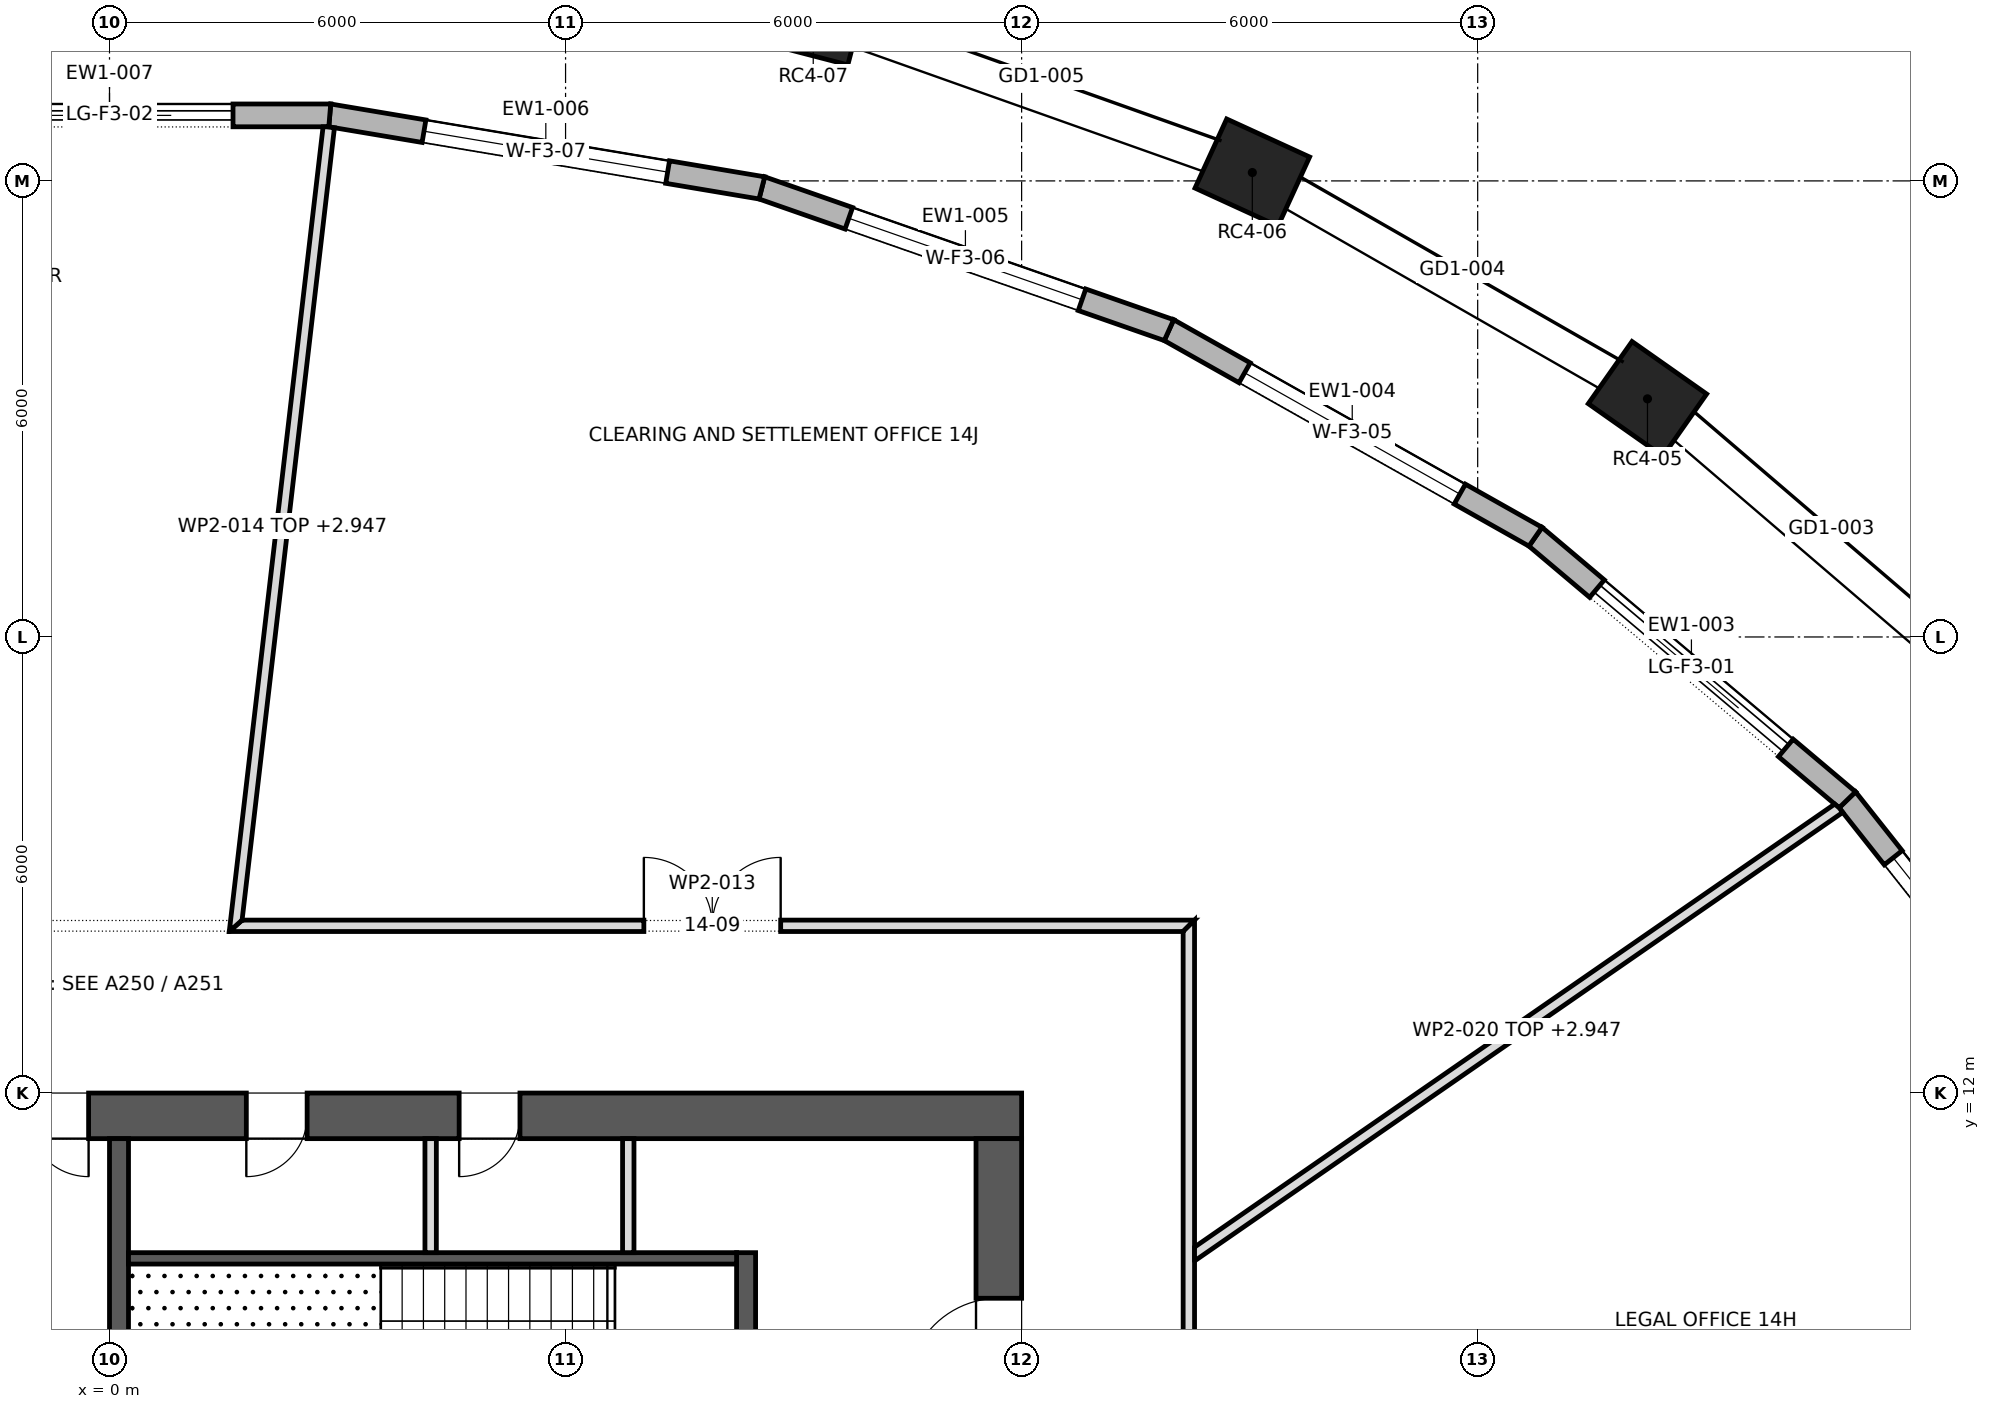
"""IFC4 building model, lengths in metres.
Left out: names, types, materials, properties, quantities, classifications, styles, units other than length and angle.
Written with IfcOpenShell. Run it as: python <this file> out.ifc"""

import sys

from ifc_helpers import new_model, si_unit, direction, frame, frame_2d, origin, origin_2d, place, context, subcontext, project, spatial, polyline, rectangle, outline, extrude, element, fill, save


model = new_model("IFC4")
c1 = context("Model", 3, precision=1e-05, world=origin(), true_north=direction((0.0, 1.0)))
c2 = subcontext(c1, "Body", "Model", "MODEL_VIEW")
j1 = project(units=[si_unit("LENGTHUNIT", "METRE"), si_unit("PLANEANGLEUNIT", "RADIAN")], contexts=[c1])
p1 = place(None, origin())
s1 = spatial("IfcSite", under=j1, at=p1, CompositionType="ELEMENT")
p2 = place(p1, origin())
s2 = spatial("IfcBuilding", under=s1, at=p2, CompositionType="ELEMENT")
p3 = place(p2, frame((0.0, 0.0, 210.9)))
s3 = spatial("IfcBuildingStorey", under=s2, at=p3, CompositionType="ELEMENT", Elevation=210.9)
for number, where, z_axis, x_axis in (
    (1, (20.234, 21.133, 0.0), (0.0, 0.0, 1.0), (-0.818, 0.575, 0.0)),
    (2, (15.035, 24.11, 0.0), (0.0, 0.0, 1.0), (-0.909, 0.417, 0.0)),
    (3, (9.259, 26.161, 0.0), (0.0, 0.0, 1.0), (-0.968, 0.252, 0.0)),
):
    element("IfcColumn", number, at=place(p3, frame(where, z_axis=z_axis, x_axis=x_axis)), inside=s3, PredefinedType="COLUMN", context=c2, shape_type="SweptSolid", body=[
        extrude(rectangle(XDim=1.2, YDim=1.0, at=origin_2d()), origin(), (0.0, 0.0, 1.0), 4.0),
    ])
p4 = place(p3, frame((-12.0, 11.7, 0.0), z_axis=(0.0, 0.0, 1.0), x_axis=(1.0, 0.0, 0.0)))
e4 = element("IfcWall", 4, at=p4, inside=s3, PredefinedType="SHEAR", context=c2, shape_type="SweptSolid", body=[
    extrude(rectangle(XDim=24.0, YDim=0.6, at=frame_2d((12.0, 0.0))), origin(), (0.0, 0.0, 1.0), 4.0),
])
p5 = place(p4, frame((9.225, 0.0, 0.0)))
e5 = element("IfcOpeningElement", 5, at=p5, cuts=e4, PredefinedType="OPENING", context=c2, shape_type="SweptSolid", body=[
    extrude(rectangle(XDim=0.9, YDim=2.1, at=frame_2d((0.45, 1.05))), frame((0.0, 0.312, 0.0), z_axis=(0.0, -1.0, 0.0), x_axis=(1.0, 0.0, 0.0)), (0.0, 0.0, 1.0), 0.624),
])
p6 = place(p4, frame((10.925, 0.0, 0.0)))
e6 = element("IfcOpeningElement", 6, at=p6, cuts=e4, PredefinedType="OPENING", context=c2, shape_type="SweptSolid", body=[
    extrude(rectangle(XDim=0.8, YDim=2.1, at=frame_2d((0.4, 1.05))), frame((0.0, 0.312, 0.0), z_axis=(0.0, -1.0, 0.0), x_axis=(1.0, 0.0, 0.0)), (0.0, 0.0, 1.0), 0.624),
])
p7 = place(p4, frame((4.2, 0.0, 0.0)))
e7 = element("IfcOpeningElement", 7, at=p7, cuts=e4, PredefinedType="OPENING", context=c2, shape_type="SweptSolid", body=[
    extrude(rectangle(XDim=0.8, YDim=2.1, at=frame_2d((0.4, 1.05))), frame((0.0, 0.312, 0.0), z_axis=(0.0, -1.0, 0.0), x_axis=(1.0, 0.0, 0.0)), (0.0, 0.0, 1.0), 0.624),
])
p8 = place(p4, frame((13.8, 0.0, 0.0)))
e8 = element("IfcOpeningElement", 8, at=p8, cuts=e4, PredefinedType="OPENING", context=c2, shape_type="SweptSolid", body=[
    extrude(rectangle(XDim=0.8, YDim=2.1, at=frame_2d((0.4, 1.05))), frame((0.0, 0.312, 0.0), z_axis=(0.0, -1.0, 0.0), x_axis=(1.0, 0.0, 0.0)), (0.0, 0.0, 1.0), 0.624),
])
p9 = place(p4, frame((16.6, 0.0, 0.0)))
e9 = element("IfcOpeningElement", 9, at=p9, cuts=e4, PredefinedType="OPENING", context=c2, shape_type="SweptSolid", body=[
    extrude(rectangle(XDim=0.8, YDim=2.1, at=frame_2d((0.4, 1.05))), frame((0.0, 0.312, 0.0), z_axis=(0.0, -1.0, 0.0), x_axis=(1.0, 0.0, 0.0)), (0.0, 0.0, 1.0), 0.624),
])
p10 = place(p3, frame((11.7, -11.4, 0.0), z_axis=(0.0, 0.0, 1.0), x_axis=(0.0, 1.0, 0.0)))
e10 = element("IfcWall", 10, at=p10, inside=s3, PredefinedType="SHEAR", context=c2, shape_type="SweptSolid", body=[
    extrude(rectangle(XDim=22.8, YDim=0.6, at=frame_2d((11.4, 0.0))), origin(), (0.0, 0.0, 1.0), 4.0),
])
p11 = place(p10, frame((10.2, 0.0, 0.0)))
e11 = element("IfcOpeningElement", 11, at=p11, cuts=e10, PredefinedType="OPENING", context=c2, shape_type="SweptSolid", body=[
    extrude(rectangle(XDim=2.4, YDim=2.1, at=frame_2d((1.2, 1.05))), frame((0.0, 0.312, 0.0), z_axis=(0.0, -1.0, 0.0), x_axis=(1.0, 0.0, 0.0)), (0.0, 0.0, 1.0), 0.624),
])
p12 = place(p10, frame((19.5, 0.0, 0.0)))
e12 = element("IfcOpeningElement", 12, at=p12, cuts=e10, PredefinedType="OPENING", context=c2, shape_type="SweptSolid", body=[
    extrude(rectangle(XDim=1.2, YDim=2.1, at=frame_2d((0.6, 1.05))), frame((0.0, 0.312, 0.0), z_axis=(0.0, -1.0, 0.0), x_axis=(1.0, 0.0, 0.0)), (0.0, 0.0, 1.0), 0.624),
])
p13 = place(p10, frame((2.1, 0.0, 0.0)))
e13 = element("IfcOpeningElement", 13, at=p13, cuts=e10, PredefinedType="OPENING", context=c2, shape_type="SweptSolid", body=[
    extrude(rectangle(XDim=1.2, YDim=2.1, at=frame_2d((0.6, 1.05))), frame((0.0, 0.312, 0.0), z_axis=(0.0, -1.0, 0.0), x_axis=(1.0, 0.0, 0.0)), (0.0, 0.0, 1.0), 0.624),
])
p14 = place(p3, frame((26.088, 11.786, 0.0), z_axis=(0.0, 0.0, 1.0), x_axis=(-0.620870264345, 0.783913333763, 0.0)))
e14 = element("IfcWall", 14, at=p14, inside=s3, PredefinedType="STANDARD", context=c2, shape_type="SweptSolid", body=[
    extrude(outline(polyline([(-0.016, -0.15), (5.21, -0.15), (5.179, 0.15), (0.016, 0.15), (-0.016, -0.15)])), origin(), (0.0, 0.0, 1.0), 3.7),
])
p15 = place(p14, frame((0.972, 0.0, 0.6)))
e15 = element("IfcOpeningElement", 15, at=p15, cuts=e14, PredefinedType="OPENING", context=c2, shape_type="SweptSolid", body=[
    extrude(rectangle(XDim=3.25, YDim=2.65, at=frame_2d((1.625, 1.325))), frame((0.0, 0.162, 0.0), z_axis=(0.0, -1.0, 0.0), x_axis=(1.0, 0.0, 0.0)), (0.0, 0.0, 1.0), 0.324),
])
p16 = place(p3, frame((22.863, 15.858, 0.0), z_axis=(0.0, 0.0, 1.0), x_axis=(-0.764386053229, 0.6447588399, 0.0)))
e16 = element("IfcWall", 16, at=p16, inside=s3, PredefinedType="STANDARD", context=c2, shape_type="SweptSolid", body=[
    extrude(outline(polyline([(-0.015, -0.15), (5.382, -0.15), (5.353, 0.15), (0.015, 0.15), (-0.015, -0.15)])), origin(), (0.0, 0.0, 1.0), 3.7),
])
p17 = place(p16, frame((1.059, 0.0, 0.0)))
e17 = element("IfcOpeningElement", 17, at=p17, cuts=e16, PredefinedType="OPENING", context=c2, shape_type="SweptSolid", body=[
    extrude(rectangle(XDim=3.25, YDim=3.25, at=frame_2d((1.625, 1.625))), frame((0.0, 0.162, 0.0), z_axis=(0.0, -1.0, 0.0), x_axis=(1.0, 0.0, 0.0)), (0.0, 0.0, 1.0), 0.324),
])
p18 = place(p3, frame((18.76, 19.319, 0.0), z_axis=(0.0, 0.0, 1.0), x_axis=(-0.871140546168, 0.491033755278, 0.0)))
e18 = element("IfcWall", 18, at=p18, inside=s3, PredefinedType="STANDARD", context=c2, shape_type="SweptSolid", body=[
    extrude(outline(polyline([(-0.014, -0.15), (5.549, -0.15), (5.522, 0.15), (0.014, 0.15), (-0.014, -0.15)])), origin(), (0.0, 0.0, 1.0), 3.7),
])
p19 = place(p18, frame((1.143, 0.0, 0.6)))
e19 = element("IfcOpeningElement", 19, at=p19, cuts=e18, PredefinedType="OPENING", context=c2, shape_type="SweptSolid", body=[
    extrude(rectangle(XDim=3.25, YDim=2.65, at=frame_2d((1.625, 1.325))), frame((0.0, 0.162, 0.0), z_axis=(0.0, -1.0, 0.0), x_axis=(1.0, 0.0, 0.0)), (0.0, 0.0, 1.0), 0.324),
])
p20 = place(p3, frame((13.938, 22.037, 0.0), z_axis=(0.0, 0.0, 1.0), x_axis=(-0.944023272224, 0.329878858824, 0.0)))
e20 = element("IfcWall", 20, at=p20, inside=s3, PredefinedType="STANDARD", context=c2, shape_type="SweptSolid", body=[
    extrude(outline(polyline([(-0.013, -0.15), (5.686, -0.15), (5.661, 0.15), (0.013, 0.15), (-0.013, -0.15)])), origin(), (0.0, 0.0, 1.0), 3.7),
])
p21 = place(p20, frame((1.212, 0.0, 0.6)))
e21 = element("IfcOpeningElement", 21, at=p21, cuts=e20, PredefinedType="OPENING", context=c2, shape_type="SweptSolid", body=[
    extrude(rectangle(XDim=3.25, YDim=2.65, at=frame_2d((1.625, 1.325))), frame((0.0, 0.162, 0.0), z_axis=(0.0, -1.0, 0.0), x_axis=(1.0, 0.0, 0.0)), (0.0, 0.0, 1.0), 0.324),
])
p22 = place(p3, frame((8.583, 23.908, 0.0), z_axis=(0.0, 0.0, 1.0), x_axis=(-0.98622052717, 0.165436005116, 0.0)))
e22 = element("IfcWall", 22, at=p22, inside=s3, PredefinedType="STANDARD", context=c2, shape_type="SweptSolid", body=[
    extrude(outline(polyline([(-0.013, -0.15), (5.777, -0.15), (5.752, 0.15), (0.013, 0.15), (-0.013, -0.15)])), origin(), (0.0, 0.0, 1.0), 3.7),
])
p23 = place(p22, frame((1.257, 0.0, 0.6)))
e23 = element("IfcOpeningElement", 23, at=p23, cuts=e22, PredefinedType="OPENING", context=c2, shape_type="SweptSolid", body=[
    extrude(rectangle(XDim=3.25, YDim=2.65, at=frame_2d((1.625, 1.325))), frame((0.0, 0.162, 0.0), z_axis=(0.0, -1.0, 0.0), x_axis=(1.0, 0.0, 0.0)), (0.0, 0.0, 1.0), 0.324),
])
p24 = place(p3, frame((2.898, 24.862, 0.0), z_axis=(0.0, 0.0, 1.0), x_axis=(-1.0, 0.0, 0.0)))
e24 = element("IfcWall", 24, at=p24, inside=s3, PredefinedType="STANDARD", context=c2, shape_type="SweptSolid", body=[
    extrude(outline(polyline([(-0.012, -0.15), (5.808, -0.15), (5.783, 0.15), (0.012, 0.15), (-0.012, -0.15)])), origin(), (0.0, 0.0, 1.0), 3.7),
])
p25 = place(p24, frame((1.273, 0.0, 0.0)))
e25 = element("IfcOpeningElement", 25, at=p25, cuts=e24, PredefinedType="OPENING", context=c2, shape_type="SweptSolid", body=[
    extrude(rectangle(XDim=3.25, YDim=3.25, at=frame_2d((1.625, 1.625))), frame((0.0, 0.162, 0.0), z_axis=(0.0, -1.0, 0.0), x_axis=(1.0, 0.0, 0.0)), (0.0, 0.0, 1.0), 0.324),
])
p26 = place(p3, frame((0.125, 6.5, 0.0), z_axis=(0.0, 0.0, 1.0), x_axis=(0.0, 1.0, 0.0)))
e26 = element("IfcWall", 26, at=p26, inside=s3, PredefinedType="SHEAR", context=c2, shape_type="SweptSolid", body=[
    extrude(rectangle(XDim=4.9, YDim=0.25, at=frame_2d((2.45, 0.0))), origin(), (0.0, 0.0, 1.0), 3.7),
])
p27 = place(p3, frame((8.375, 6.5, 0.0), z_axis=(0.0, 0.0, 1.0), x_axis=(0.0, 1.0, 0.0)))
e27 = element("IfcWall", 27, at=p27, inside=s3, PredefinedType="SHEAR", context=c2, shape_type="SweptSolid", body=[
    extrude(rectangle(XDim=3.4, YDim=0.25, at=frame_2d((1.7, 0.0))), origin(), (0.0, 0.0, 1.0), 3.7),
])
p28 = place(p27, frame((1.025, 0.0, 0.0)))
e28 = element("IfcOpeningElement", 28, at=p28, cuts=e27, PredefinedType="OPENING", context=c2, shape_type="SweptSolid", body=[
    extrude(rectangle(XDim=1.2, YDim=2.1, at=frame_2d((0.6, 1.05))), frame((0.0, 0.137, 0.0), z_axis=(0.0, -1.0, 0.0), x_axis=(1.0, 0.0, 0.0)), (0.0, 0.0, 1.0), 0.274),
])
p29 = place(p3, frame((0.25, 9.825, 0.0), z_axis=(0.0, 0.0, 1.0), x_axis=(1.0, 0.0, 0.0)))
e29 = element("IfcWall", 29, at=p29, inside=s3, PredefinedType="SHEAR", context=c2, shape_type="SweptSolid", body=[
    extrude(rectangle(XDim=8.0, YDim=0.15, at=frame_2d((4.0, 0.0))), origin(), (0.0, 0.0, 1.0), 3.7),
])
for number, where, z_axis, x_axis in (
    (30, (4.225, 9.9, 0.0), (0.0, 0.0, 1.0), (0.0, 1.0, 0.0)),
    (31, (6.825, 9.9, 0.0), (0.0, 0.0, 1.0), (0.0, 1.0, 0.0)),
):
    element("IfcWall", number, at=place(p3, frame(where, z_axis=z_axis, x_axis=x_axis)), inside=s3, PredefinedType="PARTITIONING", context=c2, shape_type="SweptSolid", body=[
        extrude(rectangle(XDim=1.5, YDim=0.15, at=frame_2d((0.75, 0.0))), origin(), (0.0, 0.0, 1.0), 3.7),
    ])
p30 = place(p3, frame((1.576, 14.2, 0.0), z_axis=(0.0, 0.0, 1.0), x_axis=(1.0, 0.0, 0.0)))
e32 = element("IfcWall", 32, at=p30, inside=s3, PredefinedType="PARTITIONING", context=c2, shape_type="SweptSolid", body=[
    extrude(outline(polyline([(0.0, -0.075), (1.793, -0.075), (3.585, -0.075), (5.378, -0.075), (7.171, -0.075), (8.964, -0.075), (10.757, -0.075), (12.549, -0.075), (12.699, 0.075), (10.909, 0.075), (9.119, 0.075), (7.329, 0.075), (5.539, 0.075), (3.749, 0.075), (1.958, 0.075), (0.168, 0.075), (0.0, -0.075)])), origin(), (0.0, 0.0, 1.0), 3.7),
])
p31 = place(p30, frame((5.454, 0.0, 0.0)))
e33 = element("IfcOpeningElement", 33, at=p31, cuts=e32, PredefinedType="OPENING", context=c2, shape_type="SweptSolid", body=[
    extrude(rectangle(XDim=1.8, YDim=2.1, at=frame_2d((0.9, 1.05))), frame((0.0, 0.087, 0.0), z_axis=(0.0, -1.0, 0.0), x_axis=(1.0, 0.0, 0.0)), (0.0, 0.0, 1.0), 0.174),
])
p32 = place(p3, frame((2.885, 24.708, 0.0), z_axis=(0.0, 0.0, 1.0), x_axis=(-0.115779808049, -0.99327490457, 0.0)))
e34 = element("IfcWall", 34, at=p32, inside=s3, PredefinedType="PARTITIONING", context=c2, shape_type="SweptSolid", body=[
    extrude(outline(polyline([(0.005, -0.075), (1.781, -0.075), (3.558, -0.075), (5.334, -0.075), (7.111, -0.075), (8.887, -0.075), (10.663, -0.075), (10.579, 0.0), (10.495, 0.075), (8.746, 0.075), (6.997, 0.075), (5.248, 0.075), (3.498, 0.075), (1.749, 0.075), (0.0, 0.075), (0.0, -0.034), (0.005, -0.075)])), origin(), (0.0, 0.0, 1.0), 2.947),
])
p33 = place(p3, frame((14.2, 1.098, 0.0), z_axis=(0.0, 0.0, 1.0), x_axis=(0.0, 1.0, 0.0)))
e35 = element("IfcWall", 35, at=p33, inside=s3, PredefinedType="PARTITIONING", context=c2, shape_type="SweptSolid", body=[
    extrude(outline(polyline([(0.163, -0.075), (2.022, -0.075), (3.881, -0.075), (5.74, -0.075), (7.599, -0.075), (9.458, -0.075), (11.317, -0.075), (13.177, -0.075), (13.027, 0.075), (11.166, 0.075), (9.305, 0.075), (7.444, 0.075), (5.583, 0.075), (3.722, 0.075), (1.861, 0.075), (0.0, 0.075), (0.163, -0.075)])), origin(), (0.0, 0.0, 1.0), 3.7),
])
p34 = place(p3, frame((14.232, 9.853, 0.0), z_axis=(0.0, 0.0, 1.0), x_axis=(0.822298116352, 0.569056946047, 0.0)))
e36 = element("IfcWall", 36, at=p34, inside=s3, PredefinedType="PARTITIONING", context=c2, shape_type="SweptSolid", body=[
    extrude(outline(polyline([(10.37, -0.075), (10.37, -0.07), (10.366, 0.002), (10.346, 0.075), (8.639, 0.075), (6.932, 0.075), (5.225, 0.075), (3.518, 0.075), (1.811, 0.075), (0.104, 0.075), (0.0, -0.075), (0.0, -0.075), (1.729, -0.075), (3.457, -0.075), (5.185, -0.075), (6.914, -0.075), (8.642, -0.075), (10.37, -0.075)])), origin(), (0.0, 0.0, 1.0), 2.947),
])
p35 = place(p15, origin())
e37 = element("IfcWindow", 37, at=p35, inside=s3, PartitioningType="TRIPLE_PANEL_VERTICAL", PredefinedType="WINDOW", context=c2, shape_type="SweptSolid", body=[
    extrude(rectangle(XDim=3.25, YDim=2.65, at=frame_2d((1.625, 1.325))), frame((0.0, 0.03, 0.0), z_axis=(0.0, -1.0, 0.0), x_axis=(1.0, 0.0, 0.0)), (0.0, 0.0, 1.0), 0.06),
])
fill(e15, e37)
p36 = place(p17, origin())
e38 = element("IfcDoor", 38, at=p36, inside=s3, OperationType="DOUBLE_DOOR_SLIDING", PredefinedType="DOOR", context=c2, shape_type="SweptSolid", body=[
    extrude(rectangle(XDim=3.25, YDim=3.25, at=frame_2d((1.625, 1.625))), frame((0.0, 0.025, 0.0), z_axis=(0.0, -1.0, 0.0), x_axis=(1.0, 0.0, 0.0)), (0.0, 0.0, 1.0), 0.05),
])
fill(e17, e38)
p37 = place(p19, origin())
e39 = element("IfcWindow", 39, at=p37, inside=s3, PartitioningType="TRIPLE_PANEL_VERTICAL", PredefinedType="WINDOW", context=c2, shape_type="SweptSolid", body=[
    extrude(rectangle(XDim=3.25, YDim=2.65, at=frame_2d((1.625, 1.325))), frame((0.0, 0.03, 0.0), z_axis=(0.0, -1.0, 0.0), x_axis=(1.0, 0.0, 0.0)), (0.0, 0.0, 1.0), 0.06),
])
fill(e19, e39)
p38 = place(p21, origin())
e40 = element("IfcWindow", 40, at=p38, inside=s3, PartitioningType="TRIPLE_PANEL_VERTICAL", PredefinedType="WINDOW", context=c2, shape_type="SweptSolid", body=[
    extrude(rectangle(XDim=3.25, YDim=2.65, at=frame_2d((1.625, 1.325))), frame((0.0, 0.03, 0.0), z_axis=(0.0, -1.0, 0.0), x_axis=(1.0, 0.0, 0.0)), (0.0, 0.0, 1.0), 0.06),
])
fill(e21, e40)
p39 = place(p23, origin())
e41 = element("IfcWindow", 41, at=p39, inside=s3, PartitioningType="TRIPLE_PANEL_VERTICAL", PredefinedType="WINDOW", context=c2, shape_type="SweptSolid", body=[
    extrude(rectangle(XDim=3.25, YDim=2.65, at=frame_2d((1.625, 1.325))), frame((0.0, 0.03, 0.0), z_axis=(0.0, -1.0, 0.0), x_axis=(1.0, 0.0, 0.0)), (0.0, 0.0, 1.0), 0.06),
])
fill(e23, e41)
p40 = place(p25, origin())
e42 = element("IfcDoor", 42, at=p40, inside=s3, OperationType="DOUBLE_DOOR_SLIDING", PredefinedType="DOOR", context=c2, shape_type="SweptSolid", body=[
    extrude(rectangle(XDim=3.25, YDim=3.25, at=frame_2d((1.625, 1.625))), frame((0.0, 0.025, 0.0), z_axis=(0.0, -1.0, 0.0), x_axis=(1.0, 0.0, 0.0)), (0.0, 0.0, 1.0), 0.05),
])
fill(e25, e42)
p41 = place(p12, origin())
e43 = element("IfcDoor", 43, at=p41, inside=s3, OperationType="SINGLE_SWING_RIGHT", PredefinedType="DOOR", context=c2, shape_type="SweptSolid", body=[
    extrude(rectangle(XDim=1.2, YDim=2.1, at=frame_2d((0.6, 1.05))), frame((0.0, 0.025, 0.0), z_axis=(0.0, -1.0, 0.0), x_axis=(1.0, 0.0, 0.0)), (0.0, 0.0, 1.0), 0.05),
])
fill(e12, e43)
p42 = place(p6, frame((0.8, 0.0, 0.0), z_axis=(0.0, 0.0, 1.0), x_axis=(-1.0, 0.0, 0.0)))
e44 = element("IfcDoor", 44, at=p42, inside=s3, OperationType="SINGLE_SWING_RIGHT", PredefinedType="DOOR", context=c2, shape_type="SweptSolid", body=[
    extrude(rectangle(XDim=0.8, YDim=2.1, at=frame_2d((0.4, 1.05))), frame((0.0, 0.025, 0.0), z_axis=(0.0, -1.0, 0.0), x_axis=(1.0, 0.0, 0.0)), (0.0, 0.0, 1.0), 0.05),
])
fill(e6, e44)
p43 = place(p8, frame((0.8, 0.0, 0.0), z_axis=(0.0, 0.0, 1.0), x_axis=(-1.0, 0.0, 0.0)))
e45 = element("IfcDoor", 45, at=p43, inside=s3, OperationType="SINGLE_SWING_LEFT", PredefinedType="DOOR", context=c2, shape_type="SweptSolid", body=[
    extrude(rectangle(XDim=0.8, YDim=2.1, at=frame_2d((0.4, 1.05))), frame((0.0, 0.025, 0.0), z_axis=(0.0, -1.0, 0.0), x_axis=(1.0, 0.0, 0.0)), (0.0, 0.0, 1.0), 0.05),
])
fill(e8, e45)
p44 = place(p9, frame((0.8, 0.0, 0.0), z_axis=(0.0, 0.0, 1.0), x_axis=(-1.0, 0.0, 0.0)))
e46 = element("IfcDoor", 46, at=p44, inside=s3, OperationType="SINGLE_SWING_LEFT", PredefinedType="DOOR", context=c2, shape_type="SweptSolid", body=[
    extrude(rectangle(XDim=0.8, YDim=2.1, at=frame_2d((0.4, 1.05))), frame((0.0, 0.025, 0.0), z_axis=(0.0, -1.0, 0.0), x_axis=(1.0, 0.0, 0.0)), (0.0, 0.0, 1.0), 0.05),
])
fill(e9, e46)
p45 = place(p31, origin())
e47 = element("IfcDoor", 47, at=p45, inside=s3, OperationType="DOUBLE_DOOR_SINGLE_SWING", PredefinedType="DOOR", context=c2, shape_type="SweptSolid", body=[
    extrude(rectangle(XDim=1.8, YDim=2.1, at=frame_2d((0.9, 1.05))), frame((0.0, 0.025, 0.0), z_axis=(0.0, -1.0, 0.0), x_axis=(1.0, 0.0, 0.0)), (0.0, 0.0, 1.0), 0.05),
])
fill(e33, e47)
save(model, sys.argv[1])
